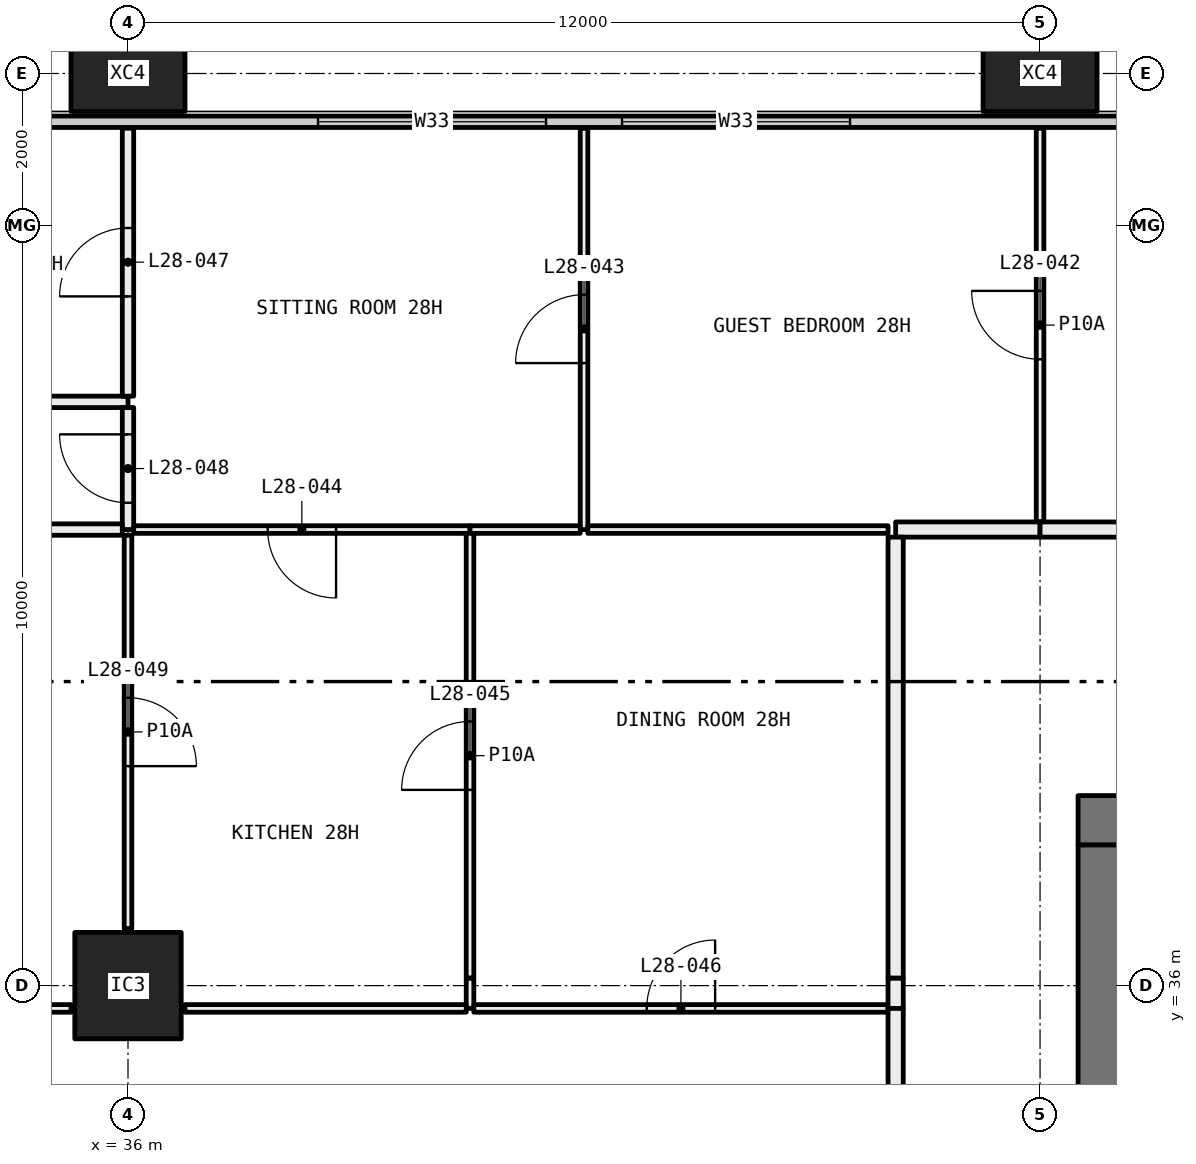
"""IFC4 building model, lengths in metres.
Left out: names, types, materials, properties, quantities, classifications, styles, units other than length and angle.
Written with IfcOpenShell. Run it as: python <this file> out.ifc"""

import sys

from ifc_helpers import new_model, si_unit, direction, frame, frame_2d, origin, origin_2d, place, context, subcontext, project, spatial, rectangle, hollow_rectangle, extrude, element, fill, save


model = new_model("IFC4")
c1 = context("Model", 3, precision=1e-05, world=origin(), true_north=direction((0.0, 1.0)))
c2 = subcontext(c1, "Body", "Model", "MODEL_VIEW")
j1 = project(units=[si_unit("LENGTHUNIT", "METRE"), si_unit("PLANEANGLEUNIT", "RADIAN")], contexts=[c1])
p1 = place(None, origin())
s1 = spatial("IfcSite", under=j1, at=p1, CompositionType="ELEMENT")
p2 = place(p1, origin())
s2 = spatial("IfcBuilding", under=s1, at=p2, CompositionType="ELEMENT")
p3 = place(p2, frame((0.0, 0.0, 110.4)))
s3 = spatial("IfcBuildingStorey", under=s2, at=p3, CompositionType="ELEMENT", Elevation=110.4)
p4 = place(p3, frame((36.0, 36.0, 0.0), z_axis=(0.0, 0.0, 1.0), x_axis=(1.0, 0.0, 0.0)))
e1 = element("IfcColumn", 1, at=p4, inside=s3, PredefinedType="COLUMN", context=c2, shape_type="SweptSolid", body=[
    extrude(hollow_rectangle(XDim=1.4, YDim=1.4, WallThickness=0.06, at=origin_2d()), origin(), (0.0, 0.0, 1.0), 3.05),
])
for number, where, z_axis, x_axis in (
    (2, (36.0, 48.0, -0.4), (0.0, 0.0, 1.0), (1.0, 0.0, 0.0)),
    (3, (48.0, 48.0, -0.4), (0.0, 0.0, 1.0), (1.0, 0.0, 0.0)),
):
    element("IfcColumn", number, at=place(p3, frame(where, z_axis=z_axis, x_axis=x_axis)), inside=s3, PredefinedType="COLUMN", context=c2, shape_type="SweptSolid", body=[
        extrude(hollow_rectangle(XDim=1.5, YDim=1.0, WallThickness=0.06, at=origin_2d()), origin(), (0.0, 0.0, 1.0), 3.45),
    ])
p5 = place(p3, frame((6.56, 47.365, 0.0), z_axis=(0.0, 0.0, 1.0), x_axis=(1.0, 0.0, 0.0)))
e4 = element("IfcWall", 4, at=p5, inside=s3, PredefinedType="ELEMENTEDWALL", context=c2, shape_type="SweptSolid", body=[
    extrude(rectangle(XDim=58.88, YDim=0.15, at=frame_2d((29.44, 0.0))), origin(), (0.0, 0.0, 1.0), 3.05),
])
p6 = place(p5, frame((0.44, 0.0, 0.45)))
e5 = element("IfcOpeningElement", 5, at=p6, cuts=e4, PredefinedType="OPENING", context=c2, shape_type="SweptSolid", body=[
    extrude(rectangle(XDim=4.5, YDim=2.55, at=frame_2d((2.25, 1.275))), frame((0.0, 0.085, 0.0), z_axis=(0.0, -1.0, 0.0), x_axis=(1.0, 0.0, 0.0)), (0.0, 0.0, 1.0), 0.17),
])
p7 = place(p5, frame((7.94, 0.0, 0.45)))
e6 = element("IfcOpeningElement", 6, at=p7, cuts=e4, PredefinedType="OPENING", context=c2, shape_type="SweptSolid", body=[
    extrude(rectangle(XDim=3.0, YDim=2.55, at=frame_2d((1.5, 1.275))), frame((0.0, 0.085, 0.0), z_axis=(0.0, -1.0, 0.0), x_axis=(1.0, 0.0, 0.0)), (0.0, 0.0, 1.0), 0.17),
])
p8 = place(p5, frame((11.94, 0.0, 0.45)))
e7 = element("IfcOpeningElement", 7, at=p8, cuts=e4, PredefinedType="OPENING", context=c2, shape_type="SweptSolid", body=[
    extrude(rectangle(XDim=3.0, YDim=2.55, at=frame_2d((1.5, 1.275))), frame((0.0, 0.085, 0.0), z_axis=(0.0, -1.0, 0.0), x_axis=(1.0, 0.0, 0.0)), (0.0, 0.0, 1.0), 0.17),
])
p9 = place(p5, frame((19.94, 0.0, 0.45)))
e8 = element("IfcOpeningElement", 8, at=p9, cuts=e4, PredefinedType="OPENING", context=c2, shape_type="SweptSolid", body=[
    extrude(rectangle(XDim=3.0, YDim=2.55, at=frame_2d((1.5, 1.275))), frame((0.0, 0.085, 0.0), z_axis=(0.0, -1.0, 0.0), x_axis=(1.0, 0.0, 0.0)), (0.0, 0.0, 1.0), 0.17),
])
p10 = place(p5, frame((23.94, 0.0, 0.45)))
e9 = element("IfcOpeningElement", 9, at=p10, cuts=e4, PredefinedType="OPENING", context=c2, shape_type="SweptSolid", body=[
    extrude(rectangle(XDim=2.0, YDim=2.55, at=frame_2d((1.0, 1.275))), frame((0.0, 0.085, 0.0), z_axis=(0.0, -1.0, 0.0), x_axis=(1.0, 0.0, 0.0)), (0.0, 0.0, 1.0), 0.17),
])
p11 = place(p5, frame((31.94, 0.0, 0.45)))
e10 = element("IfcOpeningElement", 10, at=p11, cuts=e4, PredefinedType="OPENING", context=c2, shape_type="SweptSolid", body=[
    extrude(rectangle(XDim=3.0, YDim=2.55, at=frame_2d((1.5, 1.275))), frame((0.0, 0.085, 0.0), z_axis=(0.0, -1.0, 0.0), x_axis=(1.0, 0.0, 0.0)), (0.0, 0.0, 1.0), 0.17),
])
p12 = place(p5, frame((35.94, 0.0, 0.45)))
e11 = element("IfcOpeningElement", 11, at=p12, cuts=e4, PredefinedType="OPENING", context=c2, shape_type="SweptSolid", body=[
    extrude(rectangle(XDim=3.0, YDim=2.55, at=frame_2d((1.5, 1.275))), frame((0.0, 0.085, 0.0), z_axis=(0.0, -1.0, 0.0), x_axis=(1.0, 0.0, 0.0)), (0.0, 0.0, 1.0), 0.17),
])
p13 = place(p5, frame((43.94, 0.0, 0.45)))
e12 = element("IfcOpeningElement", 12, at=p13, cuts=e4, PredefinedType="OPENING", context=c2, shape_type="SweptSolid", body=[
    extrude(rectangle(XDim=3.0, YDim=2.55, at=frame_2d((1.5, 1.275))), frame((0.0, 0.085, 0.0), z_axis=(0.0, -1.0, 0.0), x_axis=(1.0, 0.0, 0.0)), (0.0, 0.0, 1.0), 0.17),
])
p14 = place(p5, frame((47.94, 0.0, 0.45)))
e13 = element("IfcOpeningElement", 13, at=p14, cuts=e4, PredefinedType="OPENING", context=c2, shape_type="SweptSolid", body=[
    extrude(rectangle(XDim=2.0, YDim=2.55, at=frame_2d((1.0, 1.275))), frame((0.0, 0.085, 0.0), z_axis=(0.0, -1.0, 0.0), x_axis=(1.0, 0.0, 0.0)), (0.0, 0.0, 1.0), 0.17),
])
p15 = place(p5, frame((53.94, 0.0, 0.45)))
e14 = element("IfcOpeningElement", 14, at=p15, cuts=e4, PredefinedType="OPENING", context=c2, shape_type="SweptSolid", body=[
    extrude(rectangle(XDim=4.5, YDim=2.55, at=frame_2d((2.25, 1.275))), frame((0.0, 0.085, 0.0), z_axis=(0.0, -1.0, 0.0), x_axis=(1.0, 0.0, 0.0)), (0.0, 0.0, 1.0), 0.17),
])
p16 = place(p3, frame((30.1, 43.68, 0.0), z_axis=(0.0, 0.0, 1.0), x_axis=(1.0, 0.0, 0.0)))
e15 = element("IfcWall", 15, at=p16, inside=s3, PredefinedType="PARTITIONING", context=c2, shape_type="SweptSolid", body=[
    extrude(rectangle(XDim=5.9, YDim=0.15, at=frame_2d((2.95, 0.0))), origin(), (0.0, 0.0, 1.0), 2.45),
])
p17 = place(p3, frame((36.0, 43.755, 0.0), z_axis=(0.0, 0.0, 1.0), x_axis=(0.0, 1.0, 0.0)))
e16 = element("IfcWall", 16, at=p17, inside=s3, PredefinedType="PARTITIONING", context=c2, shape_type="SweptSolid", body=[
    extrude(rectangle(XDim=3.525, YDim=0.15, at=frame_2d((1.763, 0.0))), origin(), (0.0, 0.0, 1.0), 2.45),
])
p18 = place(p17, frame((1.312, 0.0, 0.0)))
e17 = element("IfcOpeningElement", 17, at=p18, cuts=e16, PredefinedType="OPENING", context=c2, shape_type="SweptSolid", body=[
    extrude(rectangle(XDim=0.9, YDim=2.1, at=frame_2d((0.45, 1.05))), frame((0.0, 0.085, 0.0), z_axis=(0.0, -1.0, 0.0), x_axis=(1.0, 0.0, 0.0)), (0.0, 0.0, 1.0), 0.17),
])
p19 = place(p3, frame((36.0, 42.0, 0.0), z_axis=(0.0, 0.0, 1.0), x_axis=(0.0, 1.0, 0.0)))
e18 = element("IfcWall", 18, at=p19, inside=s3, PredefinedType="PARTITIONING", context=c2, shape_type="SweptSolid", body=[
    extrude(rectangle(XDim=1.605, YDim=0.15, at=frame_2d((0.802, 0.0))), origin(), (0.0, 0.0, 1.0), 2.45),
])
p20 = place(p19, frame((0.353, 0.0, 0.0)))
e19 = element("IfcOpeningElement", 19, at=p20, cuts=e18, PredefinedType="OPENING", context=c2, shape_type="SweptSolid", body=[
    extrude(rectangle(XDim=0.9, YDim=2.1, at=frame_2d((0.45, 1.05))), frame((0.0, 0.085, 0.0), z_axis=(0.0, -1.0, 0.0), x_axis=(1.0, 0.0, 0.0)), (0.0, 0.0, 1.0), 0.17),
])
p21 = place(p3, frame((30.1, 42.0, 0.0), z_axis=(0.0, 0.0, 1.0), x_axis=(1.0, 0.0, 0.0)))
e20 = element("IfcWall", 20, at=p21, inside=s3, PredefinedType="PARTITIONING", context=c2, shape_type="SweptSolid", body=[
    extrude(rectangle(XDim=5.825, YDim=0.15, at=frame_2d((2.913, 0.0))), origin(), (0.0, 0.0, 1.0), 2.45),
])
p22 = place(p3, frame((42.0, 42.0, 0.0), z_axis=(0.0, 0.0, 1.0), x_axis=(0.0, 1.0, 0.0)))
e21 = element("IfcWall", 21, at=p22, inside=s3, PredefinedType="PARTITIONING", context=c2, shape_type="SweptSolid", body=[
    extrude(rectangle(XDim=5.28, YDim=0.1, at=frame_2d((2.64, 0.0))), origin(), (0.0, 0.0, 1.0), 3.05),
])
p23 = place(p22, frame((2.19, 0.0, 0.0)))
e22 = element("IfcOpeningElement", 22, at=p23, cuts=e21, PredefinedType="OPENING", context=c2, shape_type="SweptSolid", body=[
    extrude(rectangle(XDim=0.9, YDim=2.1, at=frame_2d((0.45, 1.05))), frame((0.0, 0.06, 0.0), z_axis=(0.0, -1.0, 0.0), x_axis=(1.0, 0.0, 0.0)), (0.0, 0.0, 1.0), 0.12),
])
p24 = place(p3, frame((36.075, 42.0, 0.0), z_axis=(0.0, 0.0, 1.0), x_axis=(1.0, 0.0, 0.0)))
e23 = element("IfcWall", 23, at=p24, inside=s3, PredefinedType="PARTITIONING", context=c2, shape_type="SweptSolid", body=[
    extrude(rectangle(XDim=4.425, YDim=0.1, at=frame_2d((2.212, 0.0))), origin(), (0.0, 0.0, 1.0), 2.45),
])
p25 = place(p24, frame((1.762, 0.0, 0.0)))
e24 = element("IfcOpeningElement", 24, at=p25, cuts=e23, PredefinedType="OPENING", context=c2, shape_type="SweptSolid", body=[
    extrude(rectangle(XDim=0.9, YDim=2.1, at=frame_2d((0.45, 1.05))), frame((0.0, 0.06, 0.0), z_axis=(0.0, -1.0, 0.0), x_axis=(1.0, 0.0, 0.0)), (0.0, 0.0, 1.0), 0.12),
])
p26 = place(p3, frame((40.5, 42.0, 0.0), z_axis=(0.0, 0.0, 1.0), x_axis=(1.0, 0.0, 0.0)))
e25 = element("IfcWall", 25, at=p26, inside=s3, PredefinedType="PARTITIONING", context=c2, shape_type="SweptSolid", body=[
    extrude(rectangle(XDim=1.45, YDim=0.1, at=frame_2d((0.725, 0.0))), origin(), (0.0, 0.0, 1.0), 3.05),
])
p27 = place(p3, frame((48.0, 42.1, 0.0), z_axis=(0.0, 0.0, 1.0), x_axis=(0.0, 1.0, 0.0)))
e26 = element("IfcWall", 26, at=p27, inside=s3, PredefinedType="PARTITIONING", context=c2, shape_type="SweptSolid", body=[
    extrude(rectangle(XDim=5.18, YDim=0.1, at=frame_2d((2.59, 0.0))), origin(), (0.0, 0.0, 1.0), 3.05),
])
p28 = place(p27, frame((2.14, 0.0, 0.0)))
e27 = element("IfcOpeningElement", 27, at=p28, cuts=e26, PredefinedType="OPENING", context=c2, shape_type="SweptSolid", body=[
    extrude(rectangle(XDim=0.9, YDim=2.1, at=frame_2d((0.45, 1.05))), frame((0.0, 0.06, 0.0), z_axis=(0.0, -1.0, 0.0), x_axis=(1.0, 0.0, 0.0)), (0.0, 0.0, 1.0), 0.12),
])
p29 = place(p3, frame((42.05, 42.0, 0.0), z_axis=(0.0, 0.0, 1.0), x_axis=(1.0, 0.0, 0.0)))
e28 = element("IfcWall", 28, at=p29, inside=s3, PredefinedType="PARTITIONING", context=c2, shape_type="SweptSolid", body=[
    extrude(rectangle(XDim=3.95, YDim=0.1, at=frame_2d((1.975, 0.0))), origin(), (0.0, 0.0, 1.0), 3.05),
])
p30 = place(p3, frame((46.1, 42.0, 0.0), z_axis=(0.0, 0.0, 1.0), x_axis=(1.0, 0.0, 0.0)))
e29 = element("IfcWall", 29, at=p30, inside=s3, PredefinedType="PARTITIONING", context=c2, shape_type="SweptSolid", body=[
    extrude(rectangle(XDim=1.9, YDim=0.2, at=frame_2d((0.95, 0.0))), origin(), (0.0, 0.0, 1.0), 3.05),
])
p31 = place(p3, frame((48.0, 42.0, 0.0), z_axis=(0.0, 0.0, 1.0), x_axis=(1.0, 0.0, 0.0)))
e30 = element("IfcWall", 30, at=p31, inside=s3, PredefinedType="PARTITIONING", context=c2, shape_type="SweptSolid", body=[
    extrude(rectangle(XDim=6.0, YDim=0.2, at=frame_2d((3.0, 0.0))), origin(), (0.0, 0.0, 1.0), 3.05),
])
p32 = place(p3, frame((36.0, 36.75, 0.0), z_axis=(0.0, 0.0, 1.0), x_axis=(0.0, 1.0, 0.0)))
e31 = element("IfcWall", 31, at=p32, inside=s3, PredefinedType="PARTITIONING", context=c2, shape_type="SweptSolid", body=[
    extrude(rectangle(XDim=5.175, YDim=0.1, at=frame_2d((2.587, 0.0))), origin(), (0.0, 0.0, 1.0), 2.45),
])
p33 = place(p32, frame((2.137, 0.0, 0.0)))
e32 = element("IfcOpeningElement", 32, at=p33, cuts=e31, PredefinedType="OPENING", context=c2, shape_type="SweptSolid", body=[
    extrude(rectangle(XDim=0.9, YDim=2.1, at=frame_2d((0.45, 1.05))), frame((0.0, 0.06, 0.0), z_axis=(0.0, -1.0, 0.0), x_axis=(1.0, 0.0, 0.0)), (0.0, 0.0, 1.0), 0.12),
])
p34 = place(p3, frame((34.575, 35.7, 0.0), z_axis=(0.0, 0.0, 1.0), x_axis=(1.0, 0.0, 0.0)))
e33 = element("IfcWall", 33, at=p34, inside=s3, PredefinedType="PARTITIONING", context=c2, shape_type="SweptSolid", body=[
    extrude(rectangle(XDim=0.675, YDim=0.1, at=frame_2d((0.337, 0.0))), origin(), (0.0, 0.0, 1.0), 3.05),
])
p35 = place(p3, frame((40.5, 35.7, 0.0), z_axis=(0.0, 0.0, 1.0), x_axis=(0.0, 1.0, 0.0)))
e34 = element("IfcWall", 34, at=p35, inside=s3, PredefinedType="PARTITIONING", context=c2, shape_type="SweptSolid", body=[
    extrude(rectangle(XDim=0.4, YDim=0.1, at=frame_2d((0.2, 0.0))), origin(), (0.0, 0.0, 1.0), 2.45),
])
p36 = place(p3, frame((40.5, 36.1, 0.0), z_axis=(0.0, 0.0, 1.0), x_axis=(0.0, 1.0, 0.0)))
e35 = element("IfcWall", 35, at=p36, inside=s3, PredefinedType="PARTITIONING", context=c2, shape_type="SweptSolid", body=[
    extrude(rectangle(XDim=5.85, YDim=0.1, at=frame_2d((2.925, 0.0))), origin(), (0.0, 0.0, 1.0), 3.05),
])
p37 = place(p36, frame((2.475, 0.0, 0.0)))
e36 = element("IfcOpeningElement", 36, at=p37, cuts=e35, PredefinedType="OPENING", context=c2, shape_type="SweptSolid", body=[
    extrude(rectangle(XDim=0.9, YDim=2.1, at=frame_2d((0.45, 1.05))), frame((0.0, 0.06, 0.0), z_axis=(0.0, -1.0, 0.0), x_axis=(1.0, 0.0, 0.0)), (0.0, 0.0, 1.0), 0.12),
])
p38 = place(p3, frame((36.75, 35.7, 0.0), z_axis=(0.0, 0.0, 1.0), x_axis=(1.0, 0.0, 0.0)))
e37 = element("IfcWall", 37, at=p38, inside=s3, PredefinedType="PARTITIONING", context=c2, shape_type="SweptSolid", body=[
    extrude(rectangle(XDim=3.7, YDim=0.1, at=frame_2d((1.85, 0.0))), origin(), (0.0, 0.0, 1.0), 3.05),
])
p39 = place(p3, frame((40.55, 35.7, 0.0), z_axis=(0.0, 0.0, 1.0), x_axis=(1.0, 0.0, 0.0)))
e38 = element("IfcWall", 38, at=p39, inside=s3, PredefinedType="PARTITIONING", context=c2, shape_type="SweptSolid", body=[
    extrude(rectangle(XDim=5.45, YDim=0.1, at=frame_2d((2.725, 0.0))), origin(), (0.0, 0.0, 1.0), 3.05),
])
p40 = place(p39, frame((2.275, 0.0, 0.0)))
e39 = element("IfcOpeningElement", 39, at=p40, cuts=e38, PredefinedType="OPENING", context=c2, shape_type="SweptSolid", body=[
    extrude(rectangle(XDim=0.9, YDim=2.1, at=frame_2d((0.45, 1.05))), frame((0.0, 0.06, 0.0), z_axis=(0.0, -1.0, 0.0), x_axis=(1.0, 0.0, 0.0)), (0.0, 0.0, 1.0), 0.12),
])
p41 = place(p3, frame((46.1, 35.7, 0.0), z_axis=(0.0, 0.0, 1.0), x_axis=(0.0, 1.0, 0.0)))
e40 = element("IfcWall", 40, at=p41, inside=s3, PredefinedType="PARTITIONING", context=c2, shape_type="SweptSolid", body=[
    extrude(rectangle(XDim=0.4, YDim=0.2, at=frame_2d((0.2, 0.0))), origin(), (0.0, 0.0, 1.0), 2.45),
])
p42 = place(p3, frame((46.1, 36.1, 0.0), z_axis=(0.0, 0.0, 1.0), x_axis=(0.0, 1.0, 0.0)))
e41 = element("IfcWall", 41, at=p42, inside=s3, PredefinedType="PARTITIONING", context=c2, shape_type="SweptSolid", body=[
    extrude(rectangle(XDim=5.8, YDim=0.2, at=frame_2d((2.9, 0.0))), origin(), (0.0, 0.0, 1.0), 3.05),
])
p43 = place(p3, frame((46.1, 31.3, 0.0), z_axis=(0.0, 0.0, 1.0), x_axis=(0.0, 1.0, 0.0)))
e42 = element("IfcWall", 42, at=p43, inside=s3, PredefinedType="PARTITIONING", context=c2, shape_type="SweptSolid", body=[
    extrude(rectangle(XDim=4.4, YDim=0.2, at=frame_2d((2.2, 0.0))), origin(), (0.0, 0.0, 1.0), 3.05),
])
p44 = place(p3, frame((59.5, 38.175, 0.0), z_axis=(0.0, 0.0, 1.0), x_axis=(-1.0, 0.0, 0.0)))
e43 = element("IfcWall", 43, at=p44, inside=s3, PredefinedType="SHEAR", context=c2, shape_type="SweptSolid", body=[
    extrude(rectangle(XDim=11.0, YDim=0.65, at=frame_2d((5.5, 0.0))), origin(), (0.0, 0.0, 1.0), 3.05),
])
p45 = place(p44, frame((8.475, 0.0, 0.0)))
e44 = element("IfcOpeningElement", 44, at=p45, cuts=e43, PredefinedType="OPENING", context=c2, shape_type="SweptSolid", body=[
    extrude(rectangle(XDim=1.6, YDim=2.1, at=frame_2d((0.8, 1.05))), frame((0.0, 0.335, 0.0), z_axis=(0.0, -1.0, 0.0), x_axis=(1.0, 0.0, 0.0)), (0.0, 0.0, 1.0), 0.67),
])
p46 = place(p3, frame((48.825, 22.15, 0.0), z_axis=(0.0, 0.0, 1.0), x_axis=(0.0, 1.0, 0.0)))
e45 = element("IfcWall", 45, at=p46, inside=s3, PredefinedType="SHEAR", context=c2, shape_type="SweptSolid", body=[
    extrude(rectangle(XDim=15.7, YDim=0.65, at=frame_2d((7.85, 0.0))), origin(), (0.0, 0.0, 1.0), 3.05),
])
p47 = place(p46, frame((7.05, 0.0, 0.0)))
e46 = element("IfcOpeningElement", 46, at=p47, cuts=e45, PredefinedType="OPENING", context=c2, shape_type="SweptSolid", body=[
    extrude(rectangle(XDim=1.6, YDim=2.1, at=frame_2d((0.8, 1.05))), frame((0.0, 0.335, 0.0), z_axis=(0.0, -1.0, 0.0), x_axis=(1.0, 0.0, 0.0)), (0.0, 0.0, 1.0), 0.67),
])
p48 = place(p11, origin())
e47 = element("IfcWindow", 47, at=p48, inside=s3, PartitioningType="SINGLE_PANEL", PredefinedType="WINDOW", context=c2, shape_type="SweptSolid", body=[
    extrude(rectangle(XDim=3.0, YDim=2.55, at=frame_2d((1.5, 1.275))), frame((0.0, 0.03, 0.0), z_axis=(0.0, -1.0, 0.0), x_axis=(1.0, 0.0, 0.0)), (0.0, 0.0, 1.0), 0.06),
])
fill(e10, e47)
p49 = place(p12, origin())
e48 = element("IfcWindow", 48, at=p49, inside=s3, PartitioningType="SINGLE_PANEL", PredefinedType="WINDOW", context=c2, shape_type="SweptSolid", body=[
    extrude(rectangle(XDim=3.0, YDim=2.55, at=frame_2d((1.5, 1.275))), frame((0.0, 0.03, 0.0), z_axis=(0.0, -1.0, 0.0), x_axis=(1.0, 0.0, 0.0)), (0.0, 0.0, 1.0), 0.06),
])
fill(e11, e48)
p50 = place(p28, origin())
e49 = element("IfcDoor", 49, at=p50, inside=s3, OperationType="SINGLE_SWING_LEFT", PredefinedType="DOOR", context=c2, shape_type="SweptSolid", body=[
    extrude(rectangle(XDim=0.9, YDim=2.1, at=frame_2d((0.45, 1.05))), frame((0.0, 0.025, 0.0), z_axis=(0.0, -1.0, 0.0), x_axis=(1.0, 0.0, 0.0)), (0.0, 0.0, 1.0), 0.05),
])
fill(e27, e49)
p51 = place(p23, origin())
e50 = element("IfcDoor", 50, at=p51, inside=s3, OperationType="SINGLE_SWING_RIGHT", PredefinedType="DOOR", context=c2, shape_type="SweptSolid", body=[
    extrude(rectangle(XDim=0.9, YDim=2.1, at=frame_2d((0.45, 1.05))), frame((0.0, 0.025, 0.0), z_axis=(0.0, -1.0, 0.0), x_axis=(1.0, 0.0, 0.0)), (0.0, 0.0, 1.0), 0.05),
])
fill(e22, e50)
p52 = place(p25, frame((0.9, 0.0, 0.0), x_axis=(-1.0, 0.0, 0.0)))
e51 = element("IfcDoor", 51, at=p52, inside=s3, OperationType="SINGLE_SWING_RIGHT", PredefinedType="DOOR", context=c2, shape_type="SweptSolid", body=[
    extrude(rectangle(XDim=0.9, YDim=2.1, at=frame_2d((0.45, 1.05))), frame((0.0, 0.025, 0.0), z_axis=(0.0, -1.0, 0.0), x_axis=(1.0, 0.0, 0.0)), (0.0, 0.0, 1.0), 0.05),
])
fill(e24, e51)
p53 = place(p37, origin())
e52 = element("IfcDoor", 52, at=p53, inside=s3, OperationType="SINGLE_SWING_RIGHT", PredefinedType="DOOR", context=c2, shape_type="SweptSolid", body=[
    extrude(rectangle(XDim=0.9, YDim=2.1, at=frame_2d((0.45, 1.05))), frame((0.0, 0.025, 0.0), z_axis=(0.0, -1.0, 0.0), x_axis=(1.0, 0.0, 0.0)), (0.0, 0.0, 1.0), 0.05),
])
fill(e36, e52)
p54 = place(p40, origin())
e53 = element("IfcDoor", 53, at=p54, inside=s3, OperationType="SINGLE_SWING_LEFT", PredefinedType="DOOR", context=c2, shape_type="SweptSolid", body=[
    extrude(rectangle(XDim=0.9, YDim=2.1, at=frame_2d((0.45, 1.05))), frame((0.0, 0.025, 0.0), z_axis=(0.0, -1.0, 0.0), x_axis=(1.0, 0.0, 0.0)), (0.0, 0.0, 1.0), 0.05),
])
fill(e39, e53)
p55 = place(p18, origin())
e54 = element("IfcDoor", 54, at=p55, inside=s3, OperationType="SINGLE_SWING_RIGHT", PredefinedType="DOOR", context=c2, shape_type="SweptSolid", body=[
    extrude(rectangle(XDim=0.9, YDim=2.1, at=frame_2d((0.45, 1.05))), frame((0.0, 0.025, 0.0), z_axis=(0.0, -1.0, 0.0), x_axis=(1.0, 0.0, 0.0)), (0.0, 0.0, 1.0), 0.05),
])
fill(e17, e54)
p56 = place(p20, origin())
e55 = element("IfcDoor", 55, at=p56, inside=s3, OperationType="SINGLE_SWING_LEFT", PredefinedType="DOOR", context=c2, shape_type="SweptSolid", body=[
    extrude(rectangle(XDim=0.9, YDim=2.1, at=frame_2d((0.45, 1.05))), frame((0.0, 0.025, 0.0), z_axis=(0.0, -1.0, 0.0), x_axis=(1.0, 0.0, 0.0)), (0.0, 0.0, 1.0), 0.05),
])
fill(e19, e55)
p57 = place(p33, frame((0.9, 0.0, 0.0), x_axis=(-1.0, 0.0, 0.0)))
e56 = element("IfcDoor", 56, at=p57, inside=s3, OperationType="SINGLE_SWING_LEFT", PredefinedType="DOOR", context=c2, shape_type="SweptSolid", body=[
    extrude(rectangle(XDim=0.9, YDim=2.1, at=frame_2d((0.45, 1.05))), frame((0.0, 0.025, 0.0), z_axis=(0.0, -1.0, 0.0), x_axis=(1.0, 0.0, 0.0)), (0.0, 0.0, 1.0), 0.05),
])
fill(e32, e56)
save(model, sys.argv[1])
